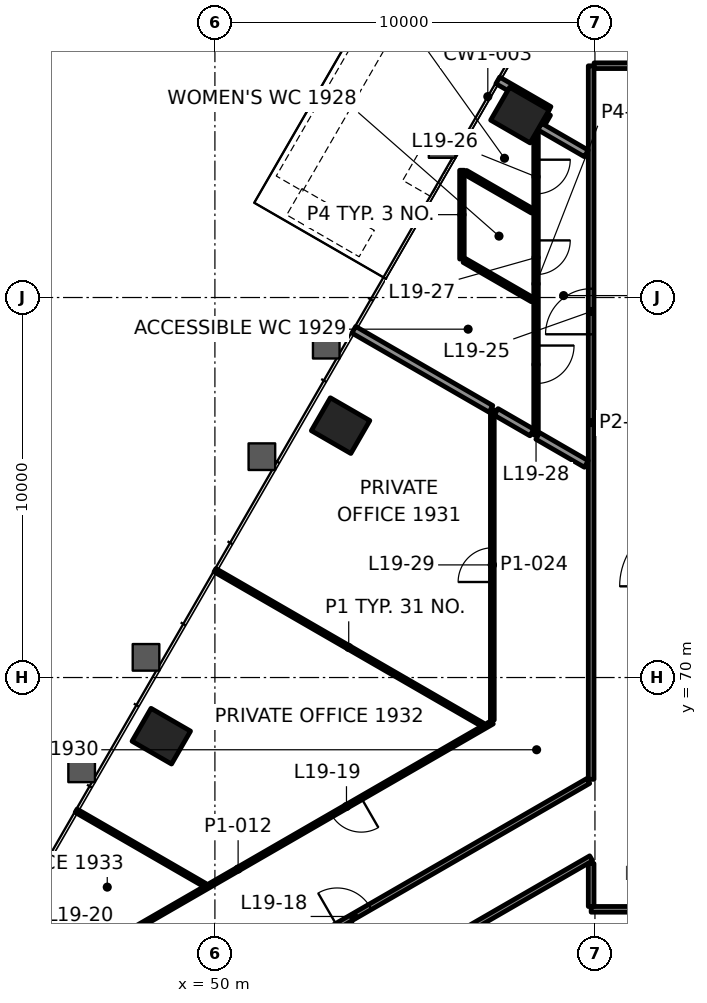
"""IFC4 building model, lengths in metres.
Left out: names, types, materials, properties, quantities, classifications, styles, units other than length and angle.
Written with IfcOpenShell. Run it as: python <this file> out.ifc"""

import sys

from ifc_helpers import new_model, si_unit, direction, frame, frame_2d, origin, origin_2d, place, context, subcontext, project, spatial, rectangle, extrude, element, fill, save


model = new_model("IFC4")
c1 = context("Model", 3, precision=1e-05, world=origin(), true_north=direction((0.0, 1.0)))
c2 = subcontext(c1, "Body", "Model", "MODEL_VIEW")
j1 = project(units=[si_unit("LENGTHUNIT", "METRE"), si_unit("PLANEANGLEUNIT", "RADIAN")], contexts=[c1])
p1 = place(None, origin())
s1 = spatial("IfcSite", under=j1, at=p1, CompositionType="ELEMENT")
p2 = place(p1, origin())
s2 = spatial("IfcBuilding", under=s1, at=p2, CompositionType="ELEMENT")
p3 = place(p2, frame((0.0, 0.0, 86.2)))
s3 = spatial("IfcBuildingStorey", under=s2, at=p3, CompositionType="ELEMENT", Elevation=86.2)
for number, where, z_axis, x_axis in (
    (1, (58.025, 84.8, -0.0), (0.0, 0.0, 1.0), (-0.5, -0.866, 0.0)),
    (2, (53.307, 76.628, -0.0), (0.0, 0.0, 1.0), (-0.5, -0.866, 0.0)),
    (3, (48.589, 68.457, -0.0), (0.0, 0.0, 1.0), (-0.5, -0.866, 0.0)),
):
    element("IfcColumn", number, at=place(p3, frame(where, z_axis=z_axis, x_axis=x_axis)), inside=s3, PredefinedType="COLUMN", context=c2, shape_type="SweptSolid", body=[
        extrude(rectangle(XDim=1.0, YDim=1.2, at=origin_2d()), origin(), (0.0, 0.0, 1.0), 4.2),
    ])
p4 = place(p3, frame((90.1, 63.9, 0.0), z_axis=(0.0, 0.0, 1.0), x_axis=(-1.0, 0.0, 0.0)))
e4 = element("IfcWall", 4, at=p4, inside=s3, PredefinedType="PARTITIONING", context=c2, shape_type="SweptSolid", body=[
    extrude(rectangle(XDim=30.2, YDim=0.15, at=frame_2d((15.1, 0.0))), origin(), (0.0, 0.0, 1.0), 3.4),
])
p5 = place(p4, frame((4.792, 0.0, 0.0)))
e5 = element("IfcOpeningElement", 5, at=p5, cuts=e4, PredefinedType="OPENING", context=c2, shape_type="SweptSolid", body=[
    extrude(rectangle(XDim=1.0, YDim=2.1, at=frame_2d((0.5, 1.05))), frame((0.0, 0.085, 0.0), z_axis=(0.0, -1.0, 0.0), x_axis=(1.0, 0.0, 0.0)), (0.0, 0.0, 1.0), 0.17),
])
p6 = place(p4, frame((11.111, 0.0, 0.0)))
e6 = element("IfcOpeningElement", 6, at=p6, cuts=e4, PredefinedType="OPENING", context=c2, shape_type="SweptSolid", body=[
    extrude(rectangle(XDim=0.9, YDim=2.1, at=frame_2d((0.45, 1.05))), frame((0.0, 0.085, 0.0), z_axis=(0.0, -1.0, 0.0), x_axis=(1.0, 0.0, 0.0)), (0.0, 0.0, 1.0), 0.17),
])
p7 = place(p4, frame((13.47, 0.0, 0.0)))
e7 = element("IfcOpeningElement", 7, at=p7, cuts=e4, PredefinedType="OPENING", context=c2, shape_type="SweptSolid", body=[
    extrude(rectangle(XDim=0.9, YDim=2.1, at=frame_2d((0.45, 1.05))), frame((0.0, 0.085, 0.0), z_axis=(0.0, -1.0, 0.0), x_axis=(1.0, 0.0, 0.0)), (0.0, 0.0, 1.0), 0.17),
])
p8 = place(p4, frame((15.83, 0.0, 0.0)))
e8 = element("IfcOpeningElement", 8, at=p8, cuts=e4, PredefinedType="OPENING", context=c2, shape_type="SweptSolid", body=[
    extrude(rectangle(XDim=0.9, YDim=2.1, at=frame_2d((0.45, 1.05))), frame((0.0, 0.085, 0.0), z_axis=(0.0, -1.0, 0.0), x_axis=(1.0, 0.0, 0.0)), (0.0, 0.0, 1.0), 0.17),
])
p9 = place(p4, frame((21.677, 0.0, 0.0)))
e9 = element("IfcOpeningElement", 9, at=p9, cuts=e4, PredefinedType="OPENING", context=c2, shape_type="SweptSolid", body=[
    extrude(rectangle(XDim=1.0, YDim=2.1, at=frame_2d((0.5, 1.05))), frame((0.0, 0.085, 0.0), z_axis=(0.0, -1.0, 0.0), x_axis=(1.0, 0.0, 0.0)), (0.0, 0.0, 1.0), 0.17),
])
p10 = place(p4, frame((27.946, 0.0, 0.0)))
e10 = element("IfcOpeningElement", 10, at=p10, cuts=e4, PredefinedType="OPENING", context=c2, shape_type="SweptSolid", body=[
    extrude(rectangle(XDim=1.0, YDim=2.1, at=frame_2d((0.5, 1.05))), frame((0.0, 0.085, 0.0), z_axis=(0.0, -1.0, 0.0), x_axis=(1.0, 0.0, 0.0)), (0.0, 0.0, 1.0), 0.17),
])
p11 = place(p3, frame((59.978, 86.1, 0.0), z_axis=(0.0, 0.0, 1.0), x_axis=(1.0, 0.0, 0.0)))
e11 = element("IfcWall", 11, at=p11, inside=s3, PredefinedType="PARTITIONING", context=c2, shape_type="SweptSolid", body=[
    extrude(rectangle(XDim=9.647, YDim=0.15, at=frame_2d((4.823, 0.0))), origin(), (0.0, 0.0, 1.0), 3.4),
])
p12 = place(p11, frame((4.323, 0.0, 0.0)))
e12 = element("IfcOpeningElement", 12, at=p12, cuts=e11, PredefinedType="OPENING", context=c2, shape_type="SweptSolid", body=[
    extrude(rectangle(XDim=1.0, YDim=2.1, at=frame_2d((0.5, 1.05))), frame((0.0, 0.085, 0.0), z_axis=(0.0, -1.0, 0.0), x_axis=(1.0, 0.0, 0.0)), (0.0, 0.0, 1.0), 0.17),
])
p13 = place(p3, frame((59.9, 65.243, 0.0), z_axis=(0.0, 0.0, 1.0), x_axis=(-0.866025527764, -0.499999785261, 0.0)))
e13 = element("IfcWall", 13, at=p13, inside=s3, PredefinedType="PARTITIONING", context=c2, shape_type="SweptSolid", body=[
    extrude(rectangle(XDim=13.31, YDim=0.15, at=frame_2d((6.655, 0.0))), origin(), (0.0, 0.0, 1.0), 3.247),
])
p14 = place(p13, frame((9.594, 0.0, 0.0)))
e14 = element("IfcOpeningElement", 14, at=p14, cuts=e13, PredefinedType="OPENING", context=c2, shape_type="SweptSolid", body=[
    extrude(rectangle(XDim=1.0, YDim=2.1, at=frame_2d((0.5, 1.05))), frame((0.0, 0.085, 0.0), z_axis=(0.0, -1.0, 0.0), x_axis=(1.0, 0.0, 0.0)), (0.0, 0.0, 1.0), 0.17),
])
p15 = place(p3, frame((47.473, 60.146, 0.0), z_axis=(0.0, 0.0, 1.0), x_axis=(0.866025677055, 0.499999526681, 0.0)))
e15 = element("IfcWall", 15, at=p15, inside=s3, PredefinedType="PARTITIONING", context=c2, shape_type="SweptSolid", body=[
    extrude(rectangle(XDim=14.263, YDim=0.15, at=frame_2d((7.132, 0.0))), origin(), (0.0, 0.0, 1.0), 3.4),
])
p16 = place(p15, frame((6.632, 0.0, 0.0)))
e16 = element("IfcOpeningElement", 16, at=p16, cuts=e15, PredefinedType="OPENING", context=c2, shape_type="SweptSolid", body=[
    extrude(rectangle(XDim=1.0, YDim=2.1, at=frame_2d((0.5, 1.05))), frame((0.0, 0.085, 0.0), z_axis=(0.0, -1.0, 0.0), x_axis=(1.0, 0.0, 0.0)), (0.0, 0.0, 1.0), 0.17),
])
p17 = place(p3, frame((57.3, 68.823, 0.0), z_axis=(0.0, 0.0, 1.0), x_axis=(-0.866026891502, -0.499997423189, 0.0)))
e17 = element("IfcWall", 17, at=p17, inside=s3, PredefinedType="PARTITIONING", context=c2, shape_type="SweptSolid", body=[
    extrude(rectangle(XDim=15.448, YDim=0.1, at=frame_2d((7.724, 0.0))), origin(), (0.0, 0.0, 1.0), 3.4),
])
p18 = place(p17, frame((3.982, 0.0, 0.0)))
e18 = element("IfcOpeningElement", 18, at=p18, cuts=e17, PredefinedType="OPENING", context=c2, shape_type="SweptSolid", body=[
    extrude(rectangle(XDim=0.9, YDim=2.1, at=frame_2d((0.45, 1.05))), frame((0.0, 0.06, 0.0), z_axis=(0.0, -1.0, 0.0), x_axis=(1.0, 0.0, 0.0)), (0.0, 0.0, 1.0), 0.12),
])
p19 = place(p17, frame((11.498, 0.0, 0.0)))
e19 = element("IfcOpeningElement", 19, at=p19, cuts=e17, PredefinedType="OPENING", context=c2, shape_type="SweptSolid", body=[
    extrude(rectangle(XDim=0.9, YDim=2.1, at=frame_2d((0.45, 1.05))), frame((0.0, 0.06, 0.0), z_axis=(0.0, -1.0, 0.0), x_axis=(1.0, 0.0, 0.0)), (0.0, 0.0, 1.0), 0.12),
])
p20 = place(p3, frame((58.595, 84.587, 0.0), z_axis=(0.0, 0.0, 1.0), x_axis=(0.499769970942, 0.866158170397, 0.0)))
e20 = element("IfcWall", 20, at=p20, inside=s3, PredefinedType="PARTITIONING", context=c2, shape_type="SweptSolid", body=[
    extrude(rectangle(XDim=0.297, YDim=0.2, at=frame_2d((0.148, 0.0))), origin(), (0.0, 0.0, 1.0), 3.4),
])
p21 = place(p3, frame((59.9, 63.975, 0.0), z_axis=(0.0, 0.0, 1.0), x_axis=(0.0, 1.0, 0.0)))
e21 = element("IfcWall", 21, at=p21, inside=s3, PredefinedType="PARTITIONING", context=c2, shape_type="SweptSolid", body=[
    extrude(rectangle(XDim=1.131, YDim=0.15, at=frame_2d((0.565, 0.0))), origin(), (0.0, 0.0, 1.0), 3.247),
])
p22 = place(p3, frame((59.9, 67.321, 0.0), z_axis=(0.0, 0.0, 1.0), x_axis=(0.0, 1.0, 0.0)))
e22 = element("IfcWall", 22, at=p22, inside=s3, PredefinedType="PARTITIONING", context=c2, shape_type="SweptSolid", body=[
    extrude(rectangle(XDim=18.776, YDim=0.15, at=frame_2d((9.388, 0.0))), origin(), (0.0, 0.0, 1.0), 3.4),
])
p23 = place(p22, frame((11.711, 0.0, 0.0)))
e23 = element("IfcOpeningElement", 23, at=p23, cuts=e22, PredefinedType="OPENING", context=c2, shape_type="SweptSolid", body=[
    extrude(rectangle(XDim=1.2, YDim=2.1, at=frame_2d((0.6, 1.05))), frame((0.0, 0.085, 0.0), z_axis=(0.0, -1.0, 0.0), x_axis=(1.0, 0.0, 0.0)), (0.0, 0.0, 1.0), 0.17),
])
p24 = place(p3, frame((58.45, 84.336, 0.0), z_axis=(0.0, 0.0, 1.0), x_axis=(0.0, -1.0, 0.0)))
e24 = element("IfcWall", 24, at=p24, inside=s3, PredefinedType="PARTITIONING", context=c2, shape_type="SweptSolid", body=[
    extrude(rectangle(XDim=7.953, YDim=0.12, at=frame_2d((3.976, 0.0))), origin(), (0.0, 0.0, 1.0), 3.4),
])
p25 = place(p24, frame((0.709, 0.0, 0.0)))
e25 = element("IfcOpeningElement", 25, at=p25, cuts=e24, PredefinedType="OPENING", context=c2, shape_type="SweptSolid", body=[
    extrude(rectangle(XDim=0.9, YDim=2.1, at=frame_2d((0.45, 1.05))), frame((0.0, 0.07, 0.0), z_axis=(0.0, -1.0, 0.0), x_axis=(1.0, 0.0, 0.0)), (0.0, 0.0, 1.0), 0.14),
])
p26 = place(p24, frame((2.833, 0.0, 0.0)))
e26 = element("IfcOpeningElement", 26, at=p26, cuts=e24, PredefinedType="OPENING", context=c2, shape_type="SweptSolid", body=[
    extrude(rectangle(XDim=0.9, YDim=2.1, at=frame_2d((0.45, 1.05))), frame((0.0, 0.07, 0.0), z_axis=(0.0, -1.0, 0.0), x_axis=(1.0, 0.0, 0.0)), (0.0, 0.0, 1.0), 0.14),
])
p27 = place(p24, frame((5.6, 0.0, 0.0)))
e27 = element("IfcOpeningElement", 27, at=p27, cuts=e24, PredefinedType="OPENING", context=c2, shape_type="SweptSolid", body=[
    extrude(rectangle(XDim=1.0, YDim=2.1, at=frame_2d((0.5, 1.05))), frame((0.0, 0.07, 0.0), z_axis=(0.0, -1.0, 0.0), x_axis=(1.0, 0.0, 0.0)), (0.0, 0.0, 1.0), 0.14),
])
p28 = place(p3, frame((57.3, 68.88, 0.0), z_axis=(0.0, 0.0, 1.0), x_axis=(0.0, 1.0, 0.0)))
e28 = element("IfcWall", 28, at=p28, inside=s3, PredefinedType="PARTITIONING", context=c2, shape_type="SweptSolid", body=[
    extrude(rectangle(XDim=8.167, YDim=0.1, at=frame_2d((4.083, 0.0))), origin(), (0.0, 0.0, 1.0), 3.4),
])
p29 = place(p28, frame((3.634, 0.0, 0.0)))
e29 = element("IfcOpeningElement", 29, at=p29, cuts=e28, PredefinedType="OPENING", context=c2, shape_type="SweptSolid", body=[
    extrude(rectangle(XDim=0.9, YDim=2.1, at=frame_2d((0.45, 1.05))), frame((0.0, 0.06, 0.0), z_axis=(0.0, -1.0, 0.0), x_axis=(1.0, 0.0, 0.0)), (0.0, 0.0, 1.0), 0.12),
])
p30 = place(p3, frame((56.5, 81.011, 0.0), z_axis=(0.0, 0.0, 1.0), x_axis=(0.0, 1.0, 0.0)))
e30 = element("IfcWall", 30, at=p30, inside=s3, PredefinedType="PARTITIONING", context=c2, shape_type="SweptSolid", body=[
    extrude(rectangle(XDim=2.338, YDim=0.12, at=frame_2d((1.169, 0.0))), origin(), (0.0, 0.0, 1.0), 3.165),
])
p31 = place(p3, frame((58.792, 84.935, 0.0), z_axis=(0.0, 0.0, 1.0), x_axis=(-0.866073306909, 0.499917020175, 0.0)))
e31 = element("IfcWall", 31, at=p31, inside=s3, PredefinedType="PARTITIONING", context=c2, shape_type="SweptSolid", body=[
    extrude(rectangle(XDim=1.557, YDim=0.2, at=frame_2d((0.778, 0.0))), origin(), (0.0, 0.0, 1.0), 3.165),
])
p32 = place(p3, frame((59.773, 83.791, 0.0), z_axis=(0.0, 0.0, 1.0), x_axis=(-0.865999255827, 0.500045286857, 0.0)))
e32 = element("IfcWall", 32, at=p32, inside=s3, PredefinedType="PARTITIONING", context=c2, shape_type="SweptSolid", body=[
    extrude(rectangle(XDim=1.418, YDim=0.2, at=frame_2d((0.709, 0.0))), origin(), (0.0, 0.0, 1.0), 3.4),
])
p33 = place(p3, frame((58.355, 82.275, 0.0), z_axis=(0.0, 0.0, 1.0), x_axis=(-0.866069607179, 0.499923429657, 0.0)))
e33 = element("IfcWall", 33, at=p33, inside=s3, PredefinedType="PARTITIONING", context=c2, shape_type="SweptSolid", body=[
    extrude(rectangle(XDim=2.033, YDim=0.12, at=frame_2d((1.017, 0.0))), origin(), (0.0, 0.0, 1.0), 3.165),
])
p34 = place(p3, frame((58.355, 79.94, 0.0), z_axis=(0.0, 0.0, 1.0), x_axis=(-0.866038486578, 0.499977339252, 0.0)))
e34 = element("IfcWall", 34, at=p34, inside=s3, PredefinedType="PARTITIONING", context=c2, shape_type="SweptSolid", body=[
    extrude(rectangle(XDim=2.073, YDim=0.12, at=frame_2d((1.036, 0.0))), origin(), (0.0, 0.0, 1.0), 3.4),
])
p35 = place(p3, frame((59.773, 75.62, 0.0), z_axis=(0.0, 0.0, 1.0), x_axis=(-0.866056109487, 0.499946812391, 0.0)))
e35 = element("IfcWall", 35, at=p35, inside=s3, PredefinedType="PARTITIONING", context=c2, shape_type="SweptSolid", body=[
    extrude(rectangle(XDim=1.476, YDim=0.2, at=frame_2d((0.738, 0.0))), origin(), (0.0, 0.0, 1.0), 3.4),
])
p36 = place(p3, frame((57.04, 68.76, 0.0), z_axis=(0.0, 0.0, 1.0), x_axis=(-0.866036506983, 0.499980768202, 0.0)))
e36 = element("IfcWall", 36, at=p36, inside=s3, PredefinedType="PARTITIONING", context=c2, shape_type="SweptSolid", body=[
    extrude(rectangle(XDim=8.127, YDim=0.1, at=frame_2d((4.063, 0.0))), origin(), (0.0, 0.0, 1.0), 3.165),
])
p37 = place(p3, frame((49.732, 64.541, 0.0), z_axis=(0.0, 0.0, 1.0), x_axis=(-0.866020177134, 0.500009052715, 0.0)))
e37 = element("IfcWall", 37, at=p37, inside=s3, PredefinedType="PARTITIONING", context=c2, shape_type="SweptSolid", body=[
    extrude(rectangle(XDim=3.908, YDim=0.1, at=frame_2d((1.954, 0.0))), origin(), (0.0, 0.0, 1.0), 3.4),
])
p38 = place(p3, frame((58.34, 76.447, 0.0), z_axis=(0.0, 0.0, 1.0), x_axis=(-0.866062005839, 0.499936598022, 0.0)))
e38 = element("IfcWall", 38, at=p38, inside=s3, PredefinedType="PARTITIONING", context=c2, shape_type="SweptSolid", body=[
    extrude(rectangle(XDim=1.086, YDim=0.2, at=frame_2d((0.543, 0.0))), origin(), (0.0, 0.0, 1.0), 3.4),
])
p39 = place(p3, frame((57.263, 77.069, 0.0), z_axis=(0.0, 0.0, 1.0), x_axis=(-0.866048944448, 0.499959224157, 0.0)))
e39 = element("IfcWall", 39, at=p39, inside=s3, PredefinedType="PARTITIONING", context=c2, shape_type="SweptSolid", body=[
    extrude(rectangle(XDim=4.165, YDim=0.2, at=frame_2d((2.083, 0.0))), origin(), (0.0, 0.0, 1.0), 3.165),
])
p40 = place(p3, frame((69.117, 112.712, 0.0), z_axis=(0.0, 0.0, 1.0), x_axis=(-0.499998392273, -0.866026332004, 0.0)))
e40 = element("IfcWall", 40, at=p40, inside=s3, PredefinedType="SOLIDWALL", context=c2, shape_type="SweptSolid", body=[
    extrude(rectangle(XDim=34.311, YDim=0.8, at=frame_2d((17.156, 0.0))), origin(), (0.0, 0.0, 1.0), 0.9),
])
p41 = place(p3, frame((52.09, 82.52, 0.0), z_axis=(0.0, 0.0, 1.0), x_axis=(0.866008176907, -0.50002983664, 0.0)))
e41 = element("IfcWall", 41, at=p41, inside=s3, PredefinedType="SOLIDWALL", context=c2, shape_type="SweptSolid", body=[
    extrude(rectangle(XDim=2.2, YDim=0.8, at=frame_2d((1.1, 0.0))), origin(), (0.0, 0.0, 1.0), 0.9),
])
p42 = place(p16, origin())
e42 = element("IfcDoor", 42, at=p42, inside=s3, OperationType="SINGLE_SWING_LEFT", PredefinedType="DOOR", context=c2, shape_type="SweptSolid", body=[
    extrude(rectangle(XDim=1.0, YDim=2.1, at=frame_2d((0.5, 1.05))), frame((0.0, 0.025, 0.0), z_axis=(0.0, -1.0, 0.0), x_axis=(1.0, 0.0, 0.0)), (0.0, 0.0, 1.0), 0.05),
])
fill(e16, e42)
p43 = place(p18, origin())
e43 = element("IfcDoor", 43, at=p43, inside=s3, OperationType="SINGLE_SWING_RIGHT", PredefinedType="DOOR", context=c2, shape_type="SweptSolid", body=[
    extrude(rectangle(XDim=0.9, YDim=2.1, at=frame_2d((0.45, 1.05))), frame((0.0, 0.025, 0.0), z_axis=(0.0, -1.0, 0.0), x_axis=(1.0, 0.0, 0.0)), (0.0, 0.0, 1.0), 0.05),
])
fill(e18, e43)
p44 = place(p23, origin())
e44 = element("IfcDoor", 44, at=p44, inside=s3, OperationType="DOUBLE_DOOR_SINGLE_SWING", PredefinedType="DOOR", context=c2, shape_type="SweptSolid", body=[
    extrude(rectangle(XDim=1.2, YDim=2.1, at=frame_2d((0.6, 1.05))), frame((0.0, 0.025, 0.0), z_axis=(0.0, -1.0, 0.0), x_axis=(1.0, 0.0, 0.0)), (0.0, 0.0, 1.0), 0.05),
])
fill(e23, e44)
p45 = place(p25, origin())
e45 = element("IfcDoor", 45, at=p45, inside=s3, OperationType="SINGLE_SWING_LEFT", PredefinedType="DOOR", context=c2, shape_type="SweptSolid", body=[
    extrude(rectangle(XDim=0.9, YDim=2.1, at=frame_2d((0.45, 1.05))), frame((0.0, 0.025, 0.0), z_axis=(0.0, -1.0, 0.0), x_axis=(1.0, 0.0, 0.0)), (0.0, 0.0, 1.0), 0.05),
])
fill(e25, e45)
p46 = place(p26, origin())
e46 = element("IfcDoor", 46, at=p46, inside=s3, OperationType="SINGLE_SWING_RIGHT", PredefinedType="DOOR", context=c2, shape_type="SweptSolid", body=[
    extrude(rectangle(XDim=0.9, YDim=2.1, at=frame_2d((0.45, 1.05))), frame((0.0, 0.025, 0.0), z_axis=(0.0, -1.0, 0.0), x_axis=(1.0, 0.0, 0.0)), (0.0, 0.0, 1.0), 0.05),
])
fill(e26, e46)
p47 = place(p27, origin())
e47 = element("IfcDoor", 47, at=p47, inside=s3, OperationType="SINGLE_SWING_LEFT", PredefinedType="DOOR", context=c2, shape_type="SweptSolid", body=[
    extrude(rectangle(XDim=1.0, YDim=2.1, at=frame_2d((0.5, 1.05))), frame((0.0, 0.025, 0.0), z_axis=(0.0, -1.0, 0.0), x_axis=(1.0, 0.0, 0.0)), (0.0, 0.0, 1.0), 0.05),
])
fill(e27, e47)
p48 = place(p29, origin())
e48 = element("IfcDoor", 48, at=p48, inside=s3, OperationType="SINGLE_SWING_RIGHT", PredefinedType="DOOR", context=c2, shape_type="SweptSolid", body=[
    extrude(rectangle(XDim=0.9, YDim=2.1, at=frame_2d((0.45, 1.05))), frame((0.0, 0.025, 0.0), z_axis=(0.0, -1.0, 0.0), x_axis=(1.0, 0.0, 0.0)), (0.0, 0.0, 1.0), 0.05),
])
fill(e29, e48)
save(model, sys.argv[1])
